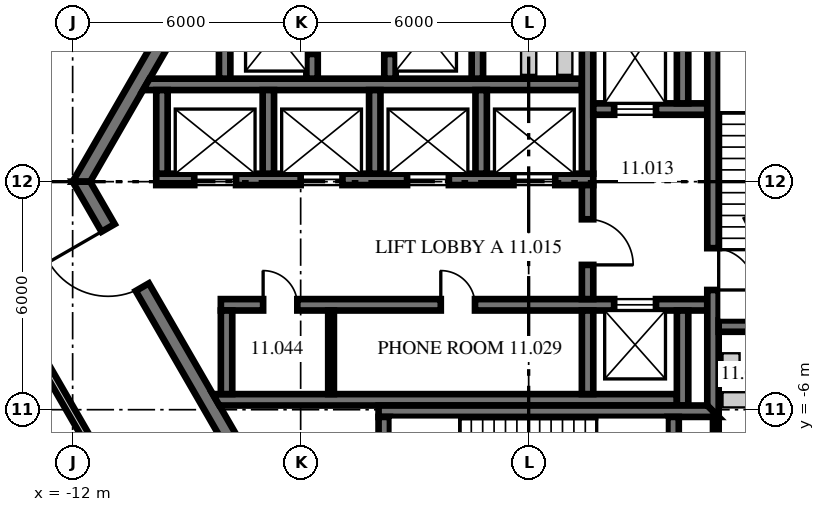
"""IFC4 building model, lengths in metres.
Left out: names, types, materials, properties, quantities, classifications, styles, units other than length and angle.
Written with IfcOpenShell. Run it as: python <this file> out.ifc"""

import sys

from ifc_helpers import new_model, si_unit, direction, frame, frame_2d, origin, place, context, subcontext, project, spatial, polyline, rectangle, outline, extrude, source, transform, mapped, element, fill, save


model = new_model("IFC4")
c1 = context("Model", 3, precision=1e-05, world=origin(), true_north=direction((0.0, 1.0)))
c2 = subcontext(c1, "Body", "Model", "MODEL_VIEW")
j1 = project(units=[si_unit("LENGTHUNIT", "METRE"), si_unit("PLANEANGLEUNIT", "RADIAN")], contexts=[c1])
p1 = place(None, origin())
s1 = spatial("IfcSite", under=j1, at=p1, CompositionType="ELEMENT")
p2 = place(p1, origin())
s2 = spatial("IfcBuilding", under=s1, at=p2, CompositionType="ELEMENT")
p3 = place(p2, frame((0.0, 0.0, 50.4)))
s3 = spatial("IfcBuildingStorey", under=s2, at=p3, CompositionType="ELEMENT", Elevation=50.4)
m1 = source(origin(), c2, "Body", "SweptSolid", [
    extrude(outline(polyline([(-0.115, -0.2), (11.885, -0.2), (11.654, 0.2), (0.115, 0.2), (-0.115, -0.2)])), origin(), (0.0, 0.0, 1.0), 4.05),
])
p4 = place(p3, frame((-5.885, 10.192, 0.0), z_axis=(0.0, 0.0, 1.0), x_axis=(-0.499996592174, -0.866027371285, 0.0)))
e1 = element("IfcWall", 1, at=p4, inside=s3, PredefinedType="SHEAR", context=c2, shape_type="MappedRepresentation", body=[
    mapped(m1, transform((0.0, 0.0, 0.0), scale=1.0)),
])
p5 = place(p4, frame((3.185, 0.0, 0.0)))
e2 = element("IfcOpeningElement", 2, at=p5, cuts=e1, PredefinedType="OPENING", context=c2, shape_type="SweptSolid", body=[
    extrude(rectangle(XDim=1.2, YDim=2.1, at=frame_2d((0.6, 1.05))), frame((0.0, 0.21, 0.0), z_axis=(0.0, -1.0, 0.0), x_axis=(1.0, 0.0, 0.0)), (0.0, 0.0, 1.0), 0.42),
])
p6 = place(p3, frame((-11.769, 0.0, 0.0), z_axis=(0.0, 0.0, 1.0), x_axis=(0.499996592174, -0.866027371285, 0.0)))
e3 = element("IfcWall", 3, at=p6, inside=s3, PredefinedType="SHEAR", context=c2, shape_type="MappedRepresentation", body=[
    mapped(m1, transform((0.0, 0.0, 0.0), scale=1.0)),
])
p7 = place(p6, frame((1.405, 0.0, 0.0)))
e4 = element("IfcOpeningElement", 4, at=p7, cuts=e3, PredefinedType="OPENING", context=c2, shape_type="SweptSolid", body=[
    extrude(rectangle(XDim=1.8, YDim=2.1, at=frame_2d((0.9, 1.05))), frame((0.0, 0.21, 0.0), z_axis=(0.0, -1.0, 0.0), x_axis=(1.0, 0.0, 0.0)), (0.0, 0.0, 1.0), 0.42),
])
p8 = place(p6, frame((7.915, 0.0, 0.0)))
e5 = element("IfcOpeningElement", 5, at=p8, cuts=e3, PredefinedType="OPENING", context=c2, shape_type="SweptSolid", body=[
    extrude(rectangle(XDim=1.2, YDim=2.1, at=frame_2d((0.6, 1.05))), frame((0.0, 0.21, 0.0), z_axis=(0.0, -1.0, 0.0), x_axis=(1.0, 0.0, 0.0)), (0.0, 0.0, 1.0), 0.42),
])
p9 = place(p3, frame((-9.8, 0.06, 0.0), z_axis=(0.0, 0.0, 1.0), x_axis=(1.0, 0.0, 0.0)))
e6 = element("IfcWall", 6, at=p9, inside=s3, PredefinedType="SHEAR", context=c2, shape_type="SweptSolid", body=[
    extrude(rectangle(XDim=11.5, YDim=0.3, at=frame_2d((5.75, 0.0))), origin(), (0.0, 0.0, 1.0), 4.05),
])
p10 = place(p9, frame((1.0, 0.0, 0.0)))
e7 = element("IfcOpeningElement", 7, at=p10, cuts=e6, PredefinedType="OPENING", context=c2, shape_type="SweptSolid", body=[
    extrude(rectangle(XDim=1.1, YDim=2.1, at=frame_2d((0.55, 1.05))), frame((0.0, 0.16, 0.0), z_axis=(0.0, -1.0, 0.0), x_axis=(1.0, 0.0, 0.0)), (0.0, 0.0, 1.0), 0.32),
])
p11 = place(p9, frame((3.8, 0.0, 0.0)))
e8 = element("IfcOpeningElement", 8, at=p11, cuts=e6, PredefinedType="OPENING", context=c2, shape_type="SweptSolid", body=[
    extrude(rectangle(XDim=1.1, YDim=2.1, at=frame_2d((0.55, 1.05))), frame((0.0, 0.16, 0.0), z_axis=(0.0, -1.0, 0.0), x_axis=(1.0, 0.0, 0.0)), (0.0, 0.0, 1.0), 0.32),
])
p12 = place(p9, frame((6.6, 0.0, 0.0)))
e9 = element("IfcOpeningElement", 9, at=p12, cuts=e6, PredefinedType="OPENING", context=c2, shape_type="SweptSolid", body=[
    extrude(rectangle(XDim=1.1, YDim=2.1, at=frame_2d((0.55, 1.05))), frame((0.0, 0.16, 0.0), z_axis=(0.0, -1.0, 0.0), x_axis=(1.0, 0.0, 0.0)), (0.0, 0.0, 1.0), 0.32),
])
p13 = place(p9, frame((9.4, 0.0, 0.0)))
e10 = element("IfcOpeningElement", 10, at=p13, cuts=e6, PredefinedType="OPENING", context=c2, shape_type="SweptSolid", body=[
    extrude(rectangle(XDim=1.1, YDim=2.1, at=frame_2d((0.55, 1.05))), frame((0.0, 0.16, 0.0), z_axis=(0.0, -1.0, 0.0), x_axis=(1.0, 0.0, 0.0)), (0.0, 0.0, 1.0), 0.32),
])
p14 = place(p3, frame((-9.8, 2.56, 0.0), z_axis=(0.0, 0.0, 1.0), x_axis=(1.0, 0.0, 0.0)))
e11 = element("IfcWall", 11, at=p14, inside=s3, PredefinedType="SHEAR", context=c2, shape_type="SweptSolid", body=[
    extrude(outline(polyline([(11.2, -0.15), (-0.349, -0.15), (-0.176, 0.15), (11.2, 0.15), (11.2, -0.15)])), origin(), (0.0, 0.0, 1.0), 4.05),
])
p15 = place(p3, frame((1.55, 0.21, 0.0), z_axis=(0.0, 0.0, 1.0), x_axis=(0.0, 1.0, 0.0)))
e12 = element("IfcWall", 12, at=p15, inside=s3, PredefinedType="SHEAR", context=c2, shape_type="SweptSolid", body=[
    extrude(rectangle(XDim=4.45, YDim=0.3, at=frame_2d((2.225, 0.0))), origin(), (0.0, 0.0, 1.0), 4.05),
])
m2 = source(origin(), c2, "Body", "SweptSolid", [
    extrude(rectangle(XDim=3.0, YDim=0.3, at=frame_2d((1.5, 0.0))), origin(), (0.0, 0.0, 1.0), 4.05),
])
p16 = place(p3, frame((1.7, 1.91, 0.0), z_axis=(0.0, 0.0, 1.0), x_axis=(1.0, 0.0, 0.0)))
e13 = element("IfcWall", 13, at=p16, inside=s3, PredefinedType="SHEAR", context=c2, shape_type="MappedRepresentation", body=[
    mapped(m2, transform((0.0, 0.0, 0.0), scale=1.0)),
])
p17 = place(p16, frame((0.55, 0.0, 0.0)))
e14 = element("IfcOpeningElement", 14, at=p17, cuts=e13, PredefinedType="OPENING", context=c2, shape_type="SweptSolid", body=[
    extrude(rectangle(XDim=1.1, YDim=2.1, at=frame_2d((0.55, 1.05))), frame((0.0, 0.16, 0.0), z_axis=(0.0, -1.0, 0.0), x_axis=(1.0, 0.0, 0.0)), (0.0, 0.0, 1.0), 0.32),
])
p18 = place(p3, frame((4.05, 2.06, 0.0), z_axis=(0.0, 0.0, 1.0), x_axis=(0.0, 1.0, 0.0)))
e15 = element("IfcWall", 15, at=p18, inside=s3, PredefinedType="SHEAR", context=c2, shape_type="SweptSolid", body=[
    extrude(rectangle(XDim=2.9, YDim=0.3, at=frame_2d((1.45, 0.0))), origin(), (0.0, 0.0, 1.0), 4.05),
])
p19 = place(p3, frame((-8.1, -3.24, 0.0), z_axis=(0.0, 0.0, 1.0), x_axis=(1.0, 0.0, 0.0)))
e16 = element("IfcWall", 16, at=p19, inside=s3, PredefinedType="SHEAR", context=c2, shape_type="SweptSolid", body=[
    extrude(rectangle(XDim=12.8, YDim=0.3, at=frame_2d((6.4, 0.0))), origin(), (0.0, 0.0, 1.0), 4.05),
])
p20 = place(p19, frame((1.113, 0.0, 0.0)))
e17 = element("IfcOpeningElement", 17, at=p20, cuts=e16, PredefinedType="OPENING", context=c2, shape_type="SweptSolid", body=[
    extrude(rectangle(XDim=0.9, YDim=2.1, at=frame_2d((0.45, 1.05))), frame((0.0, 0.16, 0.0), z_axis=(0.0, -1.0, 0.0), x_axis=(1.0, 0.0, 0.0)), (0.0, 0.0, 1.0), 0.32),
])
p21 = place(p19, frame((5.788, 0.0, 0.0)))
e18 = element("IfcOpeningElement", 18, at=p21, cuts=e16, PredefinedType="OPENING", context=c2, shape_type="SweptSolid", body=[
    extrude(rectangle(XDim=0.9, YDim=2.1, at=frame_2d((0.45, 1.05))), frame((0.0, 0.16, 0.0), z_axis=(0.0, -1.0, 0.0), x_axis=(1.0, 0.0, 0.0)), (0.0, 0.0, 1.0), 0.32),
])
p22 = place(p19, frame((10.35, 0.0, 0.0)))
e19 = element("IfcOpeningElement", 19, at=p22, cuts=e16, PredefinedType="OPENING", context=c2, shape_type="SweptSolid", body=[
    extrude(rectangle(XDim=1.1, YDim=2.1, at=frame_2d((0.55, 1.05))), frame((0.0, 0.16, 0.0), z_axis=(0.0, -1.0, 0.0), x_axis=(1.0, 0.0, 0.0)), (0.0, 0.0, 1.0), 0.32),
])
p23 = place(p3, frame((-8.1, -5.74, 0.0), z_axis=(0.0, 0.0, 1.0), x_axis=(1.0, 0.0, 0.0)))
e20 = element("IfcWall", 20, at=p23, inside=s3, PredefinedType="SHEAR", context=c2, shape_type="SweptSolid", body=[
    extrude(outline(polyline([(12.0, -0.15), (-0.04, -0.15), (-0.213, 0.15), (12.0, 0.15), (12.0, -0.15)])), origin(), (0.0, 0.0, 1.0), 4.05),
])
m3 = source(origin(), c2, "Body", "SweptSolid", [
    extrude(rectangle(XDim=2.2, YDim=0.3, at=frame_2d((1.1, 0.0))), origin(), (0.0, 0.0, 1.0), 4.05),
])
p24 = place(p3, frame((-7.95, -5.59, 0.0), z_axis=(0.0, 0.0, 1.0), x_axis=(0.0, 1.0, 0.0)))
e21 = element("IfcWall", 21, at=p24, inside=s3, PredefinedType="SHEAR", context=c2, shape_type="MappedRepresentation", body=[
    mapped(m3, transform((0.0, 0.0, 0.0), scale=1.0)),
])
m4 = source(origin(), c2, "Body", "SweptSolid", [
    extrude(rectangle(XDim=2.2, YDim=0.3, at=frame_2d((1.1, 0.0))), origin(), (0.0, 0.0, 1.0), 4.05),
])
p25 = place(p3, frame((-9.65, 0.21, 0.0), z_axis=(0.0, 0.0, 1.0), x_axis=(0.0, 1.0, 0.0)))
e22 = element("IfcWall", 22, at=p25, inside=s3, PredefinedType="SHEAR", context=c2, shape_type="MappedRepresentation", body=[
    mapped(m4, transform((0.0, 0.0, 0.0), scale=1.0)),
])
p26 = place(p3, frame((1.55, -5.59, 0.0), z_axis=(0.0, 0.0, 1.0), x_axis=(0.0, 1.0, 0.0)))
e23 = element("IfcWall", 23, at=p26, inside=s3, PredefinedType="SHEAR", context=c2, shape_type="MappedRepresentation", body=[
    mapped(m3, transform((0.0, 0.0, 0.0), scale=1.0)),
])
m5 = source(origin(), c2, "Body", "SweptSolid", [
    extrude(rectangle(XDim=2.5, YDim=0.3, at=frame_2d((1.25, 0.0))), origin(), (0.0, 0.0, 1.0), 4.05),
])
p27 = place(p3, frame((4.05, -5.89, 0.0), z_axis=(0.0, 0.0, 1.0), x_axis=(0.0, 1.0, 0.0)))
e24 = element("IfcWall", 24, at=p27, inside=s3, PredefinedType="SHEAR", context=c2, shape_type="MappedRepresentation", body=[
    mapped(m5, transform((0.0, 0.0, 0.0), scale=1.0)),
])
p28 = place(p3, frame((1.55, -3.09, 0.0), z_axis=(0.0, 0.0, 1.0), x_axis=(0.0, 1.0, 0.0)))
e25 = element("IfcWall", 25, at=p28, inside=s3, PredefinedType="SHEAR", context=c2, shape_type="MappedRepresentation", body=[
    mapped(m2, transform((0.0, 0.0, 0.0), scale=1.0)),
])
p29 = place(p28, frame((0.9, 0.0, 0.0)))
e26 = element("IfcOpeningElement", 26, at=p29, cuts=e25, PredefinedType="OPENING", context=c2, shape_type="SweptSolid", body=[
    extrude(rectangle(XDim=1.2, YDim=2.1, at=frame_2d((0.6, 1.05))), frame((0.0, 0.16, 0.0), z_axis=(0.0, -1.0, 0.0), x_axis=(1.0, 0.0, 0.0)), (0.0, 0.0, 1.0), 0.32),
])
p30 = place(p3, frame((4.85, -6.04, 0.0), z_axis=(0.0, 0.0, 1.0), x_axis=(0.0, 1.0, 0.0)))
e27 = element("IfcWall", 27, at=p30, inside=s3, PredefinedType="SHEAR", context=c2, shape_type="SweptSolid", body=[
    extrude(outline(polyline([(-0.15, -0.15), (9.99, -0.15), (9.99, 0.15), (0.15, 0.15), (-0.15, -0.15)])), origin(), (0.0, 0.0, 1.0), 4.05),
])
p31 = place(p30, frame((3.19, 0.0, 0.0)))
e28 = element("IfcOpeningElement", 28, at=p31, cuts=e27, PredefinedType="OPENING", context=c2, shape_type="SweptSolid", body=[
    extrude(rectangle(XDim=1.1, YDim=2.1, at=frame_2d((0.55, 1.05))), frame((0.0, 0.16, 0.0), z_axis=(0.0, -1.0, 0.0), x_axis=(1.0, 0.0, 0.0)), (0.0, 0.0, 1.0), 0.32),
])
p32 = place(p3, frame((5.0, -3.8, 0.0), z_axis=(0.0, 0.0, 1.0), x_axis=(1.0, 0.0, 0.0)))
e29 = element("IfcWall", 29, at=p32, inside=s3, PredefinedType="SHEAR", context=c2, shape_type="SweptSolid", body=[
    extrude(outline(polyline([(0.0, -0.15), (0.0, 0.15), (4.433, 0.15), (4.26, -0.15), (0.0, -0.15)])), origin(), (0.0, 0.0, 1.0), 4.05),
])
p33 = place(p32, frame((2.45, 0.0, 0.0)))
e30 = element("IfcOpeningElement", 30, at=p33, cuts=e29, PredefinedType="OPENING", context=c2, shape_type="SweptSolid", body=[
    extrude(rectangle(XDim=1.1, YDim=2.1, at=frame_2d((0.55, 1.05))), frame((0.0, 0.16, 0.0), z_axis=(0.0, -1.0, 0.0), x_axis=(1.0, 0.0, 0.0)), (0.0, 0.0, 1.0), 0.32),
])
p34 = place(p3, frame((-3.95, -6.04, 0.0), z_axis=(0.0, 0.0, 1.0), x_axis=(1.0, 0.0, 0.0)))
e31 = element("IfcWall", 31, at=p34, inside=s3, PredefinedType="SHEAR", context=c2, shape_type="SweptSolid", body=[
    extrude(outline(polyline([(0.0, -0.15), (8.95, -0.15), (8.65, 0.15), (0.0, 0.15), (0.0, -0.15)])), origin(), (0.0, 0.0, 1.0), 4.05),
])
m6 = source(origin(), c2, "Body", "SweptSolid", [
    extrude(outline(polyline([(3.8, -0.15), (-0.004, -0.15), (-0.004, 0.15), (3.8, 0.15), (3.8, -0.15)])), origin(), (0.0, 0.0, 1.0), 4.05),
])
for number, where, z_axis, x_axis in (
    (32, (-3.8, -9.99, 0.0), (0.0, 0.0, 1.0), (0.0, 1.0, 0.0)),
    (33, (3.8, -9.99, 0.0), (0.0, 0.0, 1.0), (0.0, 1.0, 0.0)),
):
    element("IfcWall", number, at=place(p3, frame(where, z_axis=z_axis, x_axis=x_axis)), inside=s3, PredefinedType="SHEAR", context=c2, shape_type="MappedRepresentation", body=[
        mapped(m6, transform((0.0, 0.0, 0.0), scale=1.0)),
    ])
m7 = source(origin(), c2, "Body", "SweptSolid", [
    extrude(rectangle(XDim=2.4, YDim=0.3, at=frame_2d((1.2, 0.0))), origin(), (0.0, 0.0, 1.0), 4.05),
])
p35 = place(p3, frame((-8.0, 2.71, 0.0), z_axis=(0.0, 0.0, 1.0), x_axis=(0.0, 1.0, 0.0)))
e34 = element("IfcWall", 34, at=p35, inside=s3, PredefinedType="SHEAR", context=c2, shape_type="MappedRepresentation", body=[
    mapped(m7, transform((0.0, 0.0, 0.0), scale=1.0)),
])
p36 = place(p3, frame((-5.7, 2.71, 0.0), z_axis=(0.0, 0.0, 1.0), x_axis=(0.0, 1.0, 0.0)))
e35 = element("IfcWall", 35, at=p36, inside=s3, PredefinedType="SHEAR", context=c2, shape_type="MappedRepresentation", body=[
    mapped(m7, transform((0.0, 0.0, 0.0), scale=1.0)),
])
p37 = place(p36, frame((0.65, 0.0, 0.0)))
e36 = element("IfcOpeningElement", 36, at=p37, cuts=e35, PredefinedType="OPENING", context=c2, shape_type="SweptSolid", body=[
    extrude(rectangle(XDim=1.1, YDim=2.1, at=frame_2d((0.55, 1.05))), frame((0.0, 0.16, 0.0), z_axis=(0.0, -1.0, 0.0), x_axis=(1.0, 0.0, 0.0)), (0.0, 0.0, 1.0), 0.32),
])
p38 = place(p3, frame((-3.65, 2.71, 0.0), z_axis=(0.0, 0.0, 1.0), x_axis=(0.0, 1.0, 0.0)))
e37 = element("IfcWall", 37, at=p38, inside=s3, PredefinedType="SHEAR", context=c2, shape_type="MappedRepresentation", body=[
    mapped(m7, transform((0.0, 0.0, 0.0), scale=1.0)),
])
p39 = place(p38, frame((0.65, 0.0, 0.0)))
e38 = element("IfcOpeningElement", 38, at=p39, cuts=e37, PredefinedType="OPENING", context=c2, shape_type="SweptSolid", body=[
    extrude(rectangle(XDim=1.1, YDim=2.1, at=frame_2d((0.55, 1.05))), frame((0.0, 0.16, 0.0), z_axis=(0.0, -1.0, 0.0), x_axis=(1.0, 0.0, 0.0)), (0.0, 0.0, 1.0), 0.32),
])
p40 = place(p3, frame((-1.35, 2.71, 0.0), z_axis=(0.0, 0.0, 1.0), x_axis=(0.0, 1.0, 0.0)))
e39 = element("IfcWall", 39, at=p40, inside=s3, PredefinedType="SHEAR", context=c2, shape_type="MappedRepresentation", body=[
    mapped(m7, transform((0.0, 0.0, 0.0), scale=1.0)),
])
for number, where, z_axis, x_axis in (
    (40, (-6.85, 0.21, 0.0), (0.0, 0.0, 1.0), (0.0, 1.0, 0.0)),
    (41, (-4.05, 0.21, 0.0), (0.0, 0.0, 1.0), (0.0, 1.0, 0.0)),
    (42, (-1.25, 0.21, 0.0), (0.0, 0.0, 1.0), (0.0, 1.0, 0.0)),
):
    element("IfcWall", number, at=place(p3, frame(where, z_axis=z_axis, x_axis=x_axis)), inside=s3, PredefinedType="SHEAR", context=c2, shape_type="MappedRepresentation", body=[
        mapped(m4, transform((0.0, 0.0, 0.0), scale=1.0)),
    ])
p41 = place(p3, frame((-5.2, -5.59, 0.0), z_axis=(0.0, 0.0, 1.0), x_axis=(0.0, 1.0, 0.0)))
e43 = element("IfcWall", 43, at=p41, inside=s3, PredefinedType="PARTITIONING", context=c2, shape_type="SweptSolid", body=[
    extrude(rectangle(XDim=2.2, YDim=0.15, at=frame_2d((1.1, 0.0))), origin(), (0.0, 0.0, 1.0), 4.05),
])
p42 = place(p3, frame((4.925, -8.075, 0.0), z_axis=(0.0, 0.0, 1.0), x_axis=(0.0, 1.0, 0.0)))
e44 = element("IfcWall", 44, at=p42, inside=s3, PredefinedType="PARTITIONING", context=c2, shape_type="SweptSolid", body=[
    extrude(rectangle(XDim=1.885, YDim=0.15, at=frame_2d((0.942, 0.0))), origin(), (0.0, 0.0, 1.0), 4.05),
])
p43 = place(p3, frame((-12.827, -4.668, 0.0), z_axis=(0.0, 0.0, 1.0), x_axis=(0.500014404596, -0.866017087127, 0.0)))
e45 = element("IfcWall", 45, at=p43, inside=s3, PredefinedType="PARTITIONING", context=c2, shape_type="SweptSolid", body=[
    extrude(rectangle(XDim=10.062, YDim=0.2, at=frame_2d((5.031, 0.0))), origin(), (0.0, 0.0, 1.0), 4.05),
])
p44 = place(p43, frame((4.493, 0.0, 0.0)))
e46 = element("IfcOpeningElement", 46, at=p44, cuts=e45, PredefinedType="OPENING", context=c2, shape_type="SweptSolid", body=[
    extrude(rectangle(XDim=0.9, YDim=2.1, at=frame_2d((0.45, 1.05))), frame((0.0, 0.11, 0.0), z_axis=(0.0, -1.0, 0.0), x_axis=(1.0, 0.0, 0.0)), (0.0, 0.0, 1.0), 0.22),
])
p45 = place(p7, frame((1.8, 0.0, 0.0), z_axis=(0.0, 0.0, 1.0), x_axis=(-1.0, 0.0, 0.0)))
e47 = element("IfcDoor", 47, at=p45, inside=s3, OperationType="DOUBLE_DOOR_DOUBLE_SWING", PredefinedType="DOOR", context=c2, shape_type="SweptSolid", body=[
    extrude(rectangle(XDim=1.8, YDim=2.1, at=frame_2d((0.9, 1.05))), frame((0.0, 0.025, 0.0), z_axis=(0.0, -1.0, 0.0), x_axis=(1.0, 0.0, 0.0)), (0.0, 0.0, 1.0), 0.05),
])
fill(e4, e47)
p46 = place(p31, frame((1.1, 0.0, 0.0), z_axis=(0.0, 0.0, 1.0), x_axis=(-1.0, 0.0, 0.0)))
e48 = element("IfcDoor", 48, at=p46, inside=s3, OperationType="SINGLE_SWING_RIGHT", PredefinedType="DOOR", context=c2, shape_type="SweptSolid", body=[
    extrude(rectangle(XDim=1.1, YDim=2.1, at=frame_2d((0.55, 1.05))), frame((0.0, 0.025, 0.0), z_axis=(0.0, -1.0, 0.0), x_axis=(1.0, 0.0, 0.0)), (0.0, 0.0, 1.0), 0.05),
])
fill(e28, e48)
p47 = place(p29, frame((1.2, 0.0, 0.0), z_axis=(0.0, 0.0, 1.0), x_axis=(-1.0, 0.0, 0.0)))
e49 = element("IfcDoor", 49, at=p47, inside=s3, OperationType="SINGLE_SWING_RIGHT", PredefinedType="DOOR", context=c2, shape_type="SweptSolid", body=[
    extrude(rectangle(XDim=1.2, YDim=2.1, at=frame_2d((0.6, 1.05))), frame((0.0, 0.025, 0.0), z_axis=(0.0, -1.0, 0.0), x_axis=(1.0, 0.0, 0.0)), (0.0, 0.0, 1.0), 0.05),
])
fill(e26, e49)
p48 = place(p20, origin())
e50 = element("IfcDoor", 50, at=p48, inside=s3, OperationType="SINGLE_SWING_LEFT", PredefinedType="DOOR", context=c2, shape_type="SweptSolid", body=[
    extrude(rectangle(XDim=0.9, YDim=2.1, at=frame_2d((0.45, 1.05))), frame((0.0, 0.025, 0.0), z_axis=(0.0, -1.0, 0.0), x_axis=(1.0, 0.0, 0.0)), (0.0, 0.0, 1.0), 0.05),
])
fill(e17, e50)
p49 = place(p21, origin())
e51 = element("IfcDoor", 51, at=p49, inside=s3, OperationType="SINGLE_SWING_LEFT", PredefinedType="DOOR", context=c2, shape_type="SweptSolid", body=[
    extrude(rectangle(XDim=0.9, YDim=2.1, at=frame_2d((0.45, 1.05))), frame((0.0, 0.025, 0.0), z_axis=(0.0, -1.0, 0.0), x_axis=(1.0, 0.0, 0.0)), (0.0, 0.0, 1.0), 0.05),
])
fill(e18, e51)
p50 = place(p10, origin())
e52 = element("IfcDoor", 52, at=p50, inside=s3, OperationType="DOUBLE_DOOR_SLIDING", PredefinedType="DOOR", context=c2, shape_type="SweptSolid", body=[
    extrude(rectangle(XDim=1.1, YDim=2.1, at=frame_2d((0.55, 1.05))), frame((0.0, 0.025, 0.0), z_axis=(0.0, -1.0, 0.0), x_axis=(1.0, 0.0, 0.0)), (0.0, 0.0, 1.0), 0.05),
])
fill(e7, e52)
p51 = place(p11, origin())
e53 = element("IfcDoor", 53, at=p51, inside=s3, OperationType="DOUBLE_DOOR_SLIDING", PredefinedType="DOOR", context=c2, shape_type="SweptSolid", body=[
    extrude(rectangle(XDim=1.1, YDim=2.1, at=frame_2d((0.55, 1.05))), frame((0.0, 0.025, 0.0), z_axis=(0.0, -1.0, 0.0), x_axis=(1.0, 0.0, 0.0)), (0.0, 0.0, 1.0), 0.05),
])
fill(e8, e53)
p52 = place(p12, origin())
e54 = element("IfcDoor", 54, at=p52, inside=s3, OperationType="DOUBLE_DOOR_SLIDING", PredefinedType="DOOR", context=c2, shape_type="SweptSolid", body=[
    extrude(rectangle(XDim=1.1, YDim=2.1, at=frame_2d((0.55, 1.05))), frame((0.0, 0.025, 0.0), z_axis=(0.0, -1.0, 0.0), x_axis=(1.0, 0.0, 0.0)), (0.0, 0.0, 1.0), 0.05),
])
fill(e9, e54)
p53 = place(p13, origin())
e55 = element("IfcDoor", 55, at=p53, inside=s3, OperationType="DOUBLE_DOOR_SLIDING", PredefinedType="DOOR", context=c2, shape_type="SweptSolid", body=[
    extrude(rectangle(XDim=1.1, YDim=2.1, at=frame_2d((0.55, 1.05))), frame((0.0, 0.025, 0.0), z_axis=(0.0, -1.0, 0.0), x_axis=(1.0, 0.0, 0.0)), (0.0, 0.0, 1.0), 0.05),
])
fill(e10, e55)
p54 = place(p17, origin())
e56 = element("IfcDoor", 56, at=p54, inside=s3, OperationType="DOUBLE_DOOR_SLIDING", PredefinedType="DOOR", context=c2, shape_type="SweptSolid", body=[
    extrude(rectangle(XDim=1.1, YDim=2.1, at=frame_2d((0.55, 1.05))), frame((0.0, 0.025, 0.0), z_axis=(0.0, -1.0, 0.0), x_axis=(1.0, 0.0, 0.0)), (0.0, 0.0, 1.0), 0.05),
])
fill(e14, e56)
p55 = place(p22, origin())
e57 = element("IfcDoor", 57, at=p55, inside=s3, OperationType="DOUBLE_DOOR_SLIDING", PredefinedType="DOOR", context=c2, shape_type="SweptSolid", body=[
    extrude(rectangle(XDim=1.1, YDim=2.1, at=frame_2d((0.55, 1.05))), frame((0.0, 0.025, 0.0), z_axis=(0.0, -1.0, 0.0), x_axis=(1.0, 0.0, 0.0)), (0.0, 0.0, 1.0), 0.05),
])
fill(e19, e57)
p56 = place(p37, origin())
e58 = element("IfcDoor", 58, at=p56, inside=s3, OperationType="DOUBLE_DOOR_SLIDING", PredefinedType="DOOR", context=c2, shape_type="SweptSolid", body=[
    extrude(rectangle(XDim=1.1, YDim=2.1, at=frame_2d((0.55, 1.05))), frame((0.0, 0.025, 0.0), z_axis=(0.0, -1.0, 0.0), x_axis=(1.0, 0.0, 0.0)), (0.0, 0.0, 1.0), 0.05),
])
fill(e36, e58)
p57 = place(p39, origin())
e59 = element("IfcDoor", 59, at=p57, inside=s3, OperationType="DOUBLE_DOOR_SLIDING", PredefinedType="DOOR", context=c2, shape_type="SweptSolid", body=[
    extrude(rectangle(XDim=1.1, YDim=2.1, at=frame_2d((0.55, 1.05))), frame((0.0, 0.025, 0.0), z_axis=(0.0, -1.0, 0.0), x_axis=(1.0, 0.0, 0.0)), (0.0, 0.0, 1.0), 0.05),
])
fill(e38, e59)
save(model, sys.argv[1])
